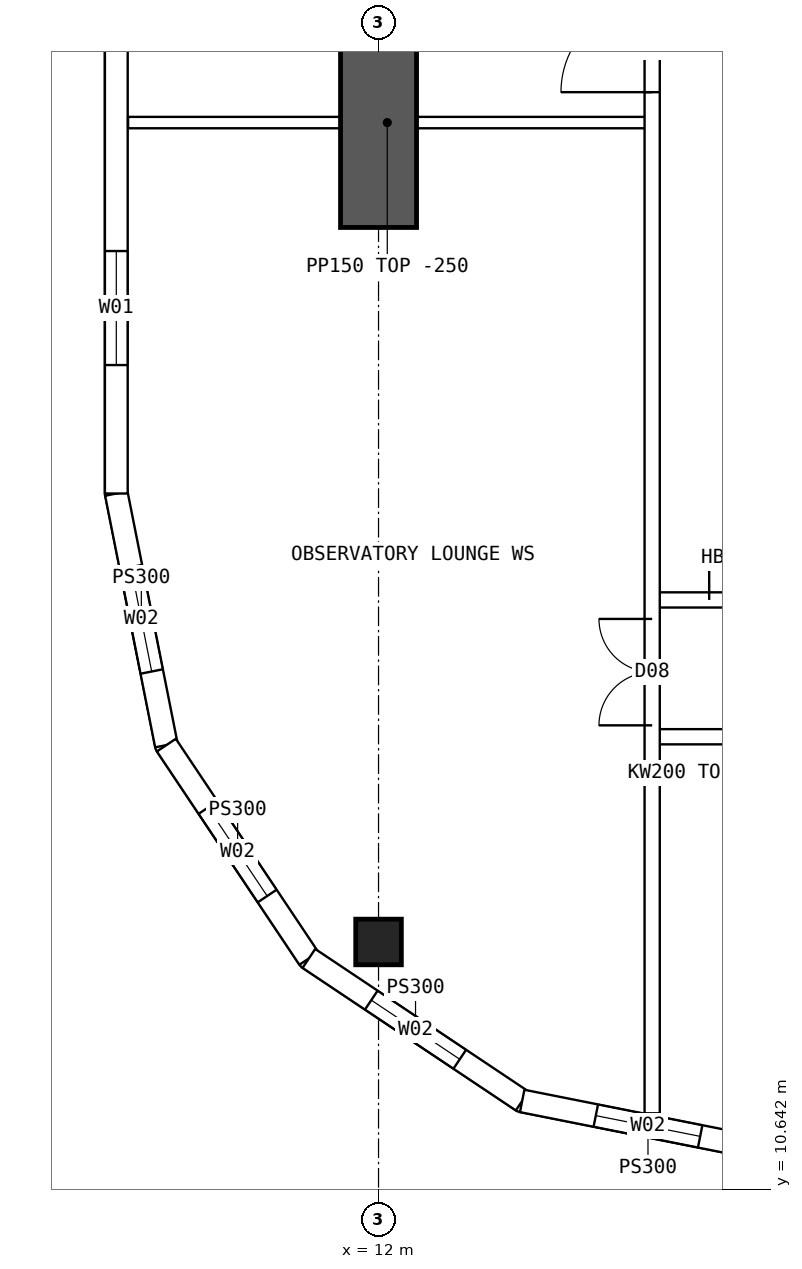
"""IFC4 building model, lengths in metres.
Left out: names, types, materials, properties, quantities, classifications, styles, units other than length and angle.
Written with IfcOpenShell. Run it as: python <this file> out.ifc"""

import sys

from ifc_helpers import new_model, si_unit, direction, frame, frame_2d, origin, origin_2d, place, context, subcontext, project, spatial, polyline, rectangle, hollow_rectangle, outline, extrude, element, fill, save


model = new_model("IFC4")
c1 = context("Model", 3, precision=1e-05, world=origin(), true_north=direction((0.0, 1.0)))
c2 = subcontext(c1, "Body", "Model", "MODEL_VIEW")
j1 = project(units=[si_unit("LENGTHUNIT", "METRE"), si_unit("PLANEANGLEUNIT", "RADIAN")], contexts=[c1])
p1 = place(None, origin())
s1 = spatial("IfcSite", under=j1, at=p1, CompositionType="ELEMENT")
p2 = place(p1, origin())
s2 = spatial("IfcBuilding", under=s1, at=p2, CompositionType="ELEMENT")
p3 = place(p2, frame((0.0, 0.0, 216.55)))
s3 = spatial("IfcBuildingStorey", under=s2, at=p3, CompositionType="ELEMENT", Elevation=216.55)
p4 = place(p3, frame((12.0, 13.9, 0.0), z_axis=(0.0, 0.0, 1.0), x_axis=(1.0, 0.0, 0.0)))
e1 = element("IfcColumn", 1, at=p4, inside=s3, PredefinedType="COLUMN", context=c2, shape_type="SweptSolid", body=[
    extrude(hollow_rectangle(XDim=0.6, YDim=0.6, WallThickness=0.06, at=origin_2d()), origin(), (0.0, 0.0, 1.0), 3.75),
])
p5 = place(p3, frame((12.0, 23.3, 0.0), z_axis=(0.0, 0.0, 1.0), x_axis=(0.0, 1.0, 0.0)))
e2 = element("IfcWall", 2, at=p5, inside=s3, PredefinedType="SHEAR", context=c2, shape_type="SweptSolid", body=[
    extrude(rectangle(XDim=5.0, YDim=1.0, at=frame_2d((2.5, 0.0))), origin(), (0.0, 0.0, 1.0), 3.75),
])
p6 = place(p3, frame((8.55, 44.2, 0.0), z_axis=(0.0, 0.0, 1.0), x_axis=(0.0, -1.0, 0.0)))
e3 = element("IfcWall", 3, at=p6, inside=s3, PredefinedType="SOLIDWALL", context=c2, shape_type="SweptSolid", body=[
    extrude(outline(polyline([(-0.015, -0.15), (24.415, -0.15), (24.385, 0.15), (0.015, 0.15), (-0.015, -0.15)])), origin(), (0.0, 0.0, 1.0), 3.5),
])
p7 = place(p6, frame((1.69, 0.0, 0.9)))
e4 = element("IfcOpeningElement", 4, at=p7, cuts=e3, PredefinedType="OPENING", context=c2, shape_type="SweptSolid", body=[
    extrude(rectangle(XDim=1.5, YDim=2.0, at=frame_2d((0.75, 1.0))), frame((0.0, 0.16, 0.0), z_axis=(0.0, -1.0, 0.0), x_axis=(1.0, 0.0, 0.0)), (0.0, 0.0, 1.0), 0.32),
])
p8 = place(p6, frame((6.57, 0.0, 0.9)))
e5 = element("IfcOpeningElement", 5, at=p8, cuts=e3, PredefinedType="OPENING", context=c2, shape_type="SweptSolid", body=[
    extrude(rectangle(XDim=1.5, YDim=2.0, at=frame_2d((0.75, 1.0))), frame((0.0, 0.16, 0.0), z_axis=(0.0, -1.0, 0.0), x_axis=(1.0, 0.0, 0.0)), (0.0, 0.0, 1.0), 0.32),
])
p9 = place(p6, frame((11.45, 0.0, 0.9)))
e6 = element("IfcOpeningElement", 6, at=p9, cuts=e3, PredefinedType="OPENING", context=c2, shape_type="SweptSolid", body=[
    extrude(rectangle(XDim=1.5, YDim=2.0, at=frame_2d((0.75, 1.0))), frame((0.0, 0.16, 0.0), z_axis=(0.0, -1.0, 0.0), x_axis=(1.0, 0.0, 0.0)), (0.0, 0.0, 1.0), 0.32),
])
p10 = place(p6, frame((16.33, 0.0, 0.9)))
e7 = element("IfcOpeningElement", 7, at=p10, cuts=e3, PredefinedType="OPENING", context=c2, shape_type="SweptSolid", body=[
    extrude(rectangle(XDim=1.5, YDim=2.0, at=frame_2d((0.75, 1.0))), frame((0.0, 0.16, 0.0), z_axis=(0.0, -1.0, 0.0), x_axis=(1.0, 0.0, 0.0)), (0.0, 0.0, 1.0), 0.32),
])
p11 = place(p6, frame((21.21, 0.0, 0.9)))
e8 = element("IfcOpeningElement", 8, at=p11, cuts=e3, PredefinedType="OPENING", context=c2, shape_type="SweptSolid", body=[
    extrude(rectangle(XDim=1.5, YDim=2.0, at=frame_2d((0.75, 1.0))), frame((0.0, 0.16, 0.0), z_axis=(0.0, -1.0, 0.0), x_axis=(1.0, 0.0, 0.0)), (0.0, 0.0, 1.0), 0.32),
])
p12 = place(p3, frame((8.55, 19.8, 0.0), z_axis=(0.0, 0.0, 1.0), x_axis=(0.19508664885, -0.980786011034, 0.0)))
e9 = element("IfcWall", 9, at=p12, inside=s3, PredefinedType="SOLIDWALL", context=c2, shape_type="SweptSolid", body=[
    extrude(outline(polyline([(-0.015, -0.15), (3.405, -0.15), (3.345, 0.15), (0.015, 0.15), (-0.015, -0.15)])), origin(), (0.0, 0.0, 1.0), 3.5),
])
p13 = place(p12, frame((0.988, 0.0, 0.9)))
e10 = element("IfcOpeningElement", 10, at=p13, cuts=e9, PredefinedType="OPENING", context=c2, shape_type="SweptSolid", body=[
    extrude(rectangle(XDim=1.4, YDim=1.8, at=frame_2d((0.7, 0.9))), frame((0.0, 0.16, 0.0), z_axis=(0.0, -1.0, 0.0), x_axis=(1.0, 0.0, 0.0)), (0.0, 0.0, 1.0), 0.32),
])
p14 = place(p3, frame((9.208, 16.49, 0.0), z_axis=(0.0, 0.0, 1.0), x_axis=(0.555567969291, -0.831471124873, 0.0)))
e11 = element("IfcWall", 11, at=p14, inside=s3, PredefinedType="SOLIDWALL", context=c2, shape_type="SweptSolid", body=[
    extrude(outline(polyline([(-0.03, -0.15), (3.405, -0.15), (3.345, 0.15), (0.03, 0.15), (-0.03, -0.15)])), origin(), (0.0, 0.0, 1.0), 3.5),
])
p15 = place(p14, frame((0.988, 0.0, 0.9)))
e12 = element("IfcOpeningElement", 12, at=p15, cuts=e11, PredefinedType="OPENING", context=c2, shape_type="SweptSolid", body=[
    extrude(rectangle(XDim=1.4, YDim=1.8, at=frame_2d((0.7, 0.9))), frame((0.0, 0.16, 0.0), z_axis=(0.0, -1.0, 0.0), x_axis=(1.0, 0.0, 0.0)), (0.0, 0.0, 1.0), 0.32),
])
p16 = place(p3, frame((11.083, 13.684, 0.0), z_axis=(0.0, 0.0, 1.0), x_axis=(0.831460037396, -0.555584562613, 0.0)))
e13 = element("IfcWall", 13, at=p16, inside=s3, PredefinedType="SOLIDWALL", context=c2, shape_type="SweptSolid", body=[
    extrude(outline(polyline([(-0.03, -0.15), (3.405, -0.15), (3.345, 0.15), (0.03, 0.15), (-0.03, -0.15)])), origin(), (0.0, 0.0, 1.0), 3.5),
])
p17 = place(p16, frame((0.988, 0.0, 0.9)))
e14 = element("IfcOpeningElement", 14, at=p17, cuts=e13, PredefinedType="OPENING", context=c2, shape_type="SweptSolid", body=[
    extrude(rectangle(XDim=1.4, YDim=1.8, at=frame_2d((0.7, 0.9))), frame((0.0, 0.16, 0.0), z_axis=(0.0, -1.0, 0.0), x_axis=(1.0, 0.0, 0.0)), (0.0, 0.0, 1.0), 0.32),
])
p18 = place(p3, frame((13.89, 11.808, 0.0), z_axis=(0.0, 0.0, 1.0), x_axis=(0.98078325777, -0.195100490205, 0.0)))
e15 = element("IfcWall", 15, at=p18, inside=s3, PredefinedType="SOLIDWALL", context=c2, shape_type="SweptSolid", body=[
    extrude(outline(polyline([(-0.03, -0.15), (3.405, -0.15), (3.345, 0.15), (0.03, 0.15), (-0.03, -0.15)])), origin(), (0.0, 0.0, 1.0), 3.5),
])
p19 = place(p18, frame((0.988, 0.0, 0.9)))
e16 = element("IfcOpeningElement", 16, at=p19, cuts=e15, PredefinedType="OPENING", context=c2, shape_type="SweptSolid", body=[
    extrude(rectangle(XDim=1.4, YDim=1.8, at=frame_2d((0.7, 0.9))), frame((0.0, 0.16, 0.0), z_axis=(0.0, -1.0, 0.0), x_axis=(1.0, 0.0, 0.0)), (0.0, 0.0, 1.0), 0.32),
])
p20 = place(p3, frame((15.6, 16.6, 0.0), z_axis=(0.0, 0.0, 1.0), x_axis=(1.0, 0.0, 0.0)))
e17 = element("IfcWall", 17, at=p20, inside=s3, PredefinedType="SOLIDWALL", context=c2, shape_type="SweptSolid", body=[
    extrude(rectangle(XDim=2.05, YDim=0.2, at=frame_2d((1.025, 0.0))), origin(), (0.0, 0.0, 1.0), 3.5),
])
p21 = place(p20, frame((0.95, 0.0, 0.0)))
e18 = element("IfcOpeningElement", 18, at=p21, cuts=e17, PredefinedType="OPENING", context=c2, shape_type="SweptSolid", body=[
    extrude(rectangle(XDim=0.9, YDim=2.1, at=frame_2d((0.45, 1.05))), frame((0.0, 0.11, 0.0), z_axis=(0.0, -1.0, 0.0), x_axis=(1.0, 0.0, 0.0)), (0.0, 0.0, 1.0), 0.22),
])
p22 = place(p3, frame((15.6, 18.4, 0.0), z_axis=(0.0, 0.0, 1.0), x_axis=(1.0, 0.0, 0.0)))
e19 = element("IfcWall", 19, at=p22, inside=s3, PredefinedType="SOLIDWALL", context=c2, shape_type="SweptSolid", body=[
    extrude(rectangle(XDim=2.05, YDim=0.2, at=frame_2d((1.025, 0.0))), origin(), (0.0, 0.0, 1.0), 3.5),
])
p23 = place(p22, frame((0.75, 0.0, 0.0)))
e20 = element("IfcOpeningElement", 20, at=p23, cuts=e19, PredefinedType="OPENING", context=c2, shape_type="SweptSolid", body=[
    extrude(rectangle(XDim=1.2, YDim=2.1, at=frame_2d((0.6, 1.05))), frame((0.0, 0.11, 0.0), z_axis=(0.0, -1.0, 0.0), x_axis=(1.0, 0.0, 0.0)), (0.0, 0.0, 1.0), 0.22),
])
p24 = place(p3, frame((15.6, 11.646, 0.0), z_axis=(0.0, 0.0, 1.0), x_axis=(0.0, 1.0, 0.0)))
e21 = element("IfcWall", 21, at=p24, inside=s3, PredefinedType="SOLIDWALL", context=c2, shape_type="SweptSolid", body=[
    extrude(rectangle(XDim=40.708, YDim=0.2, at=frame_2d((20.354, 0.0))), origin(), (0.0, 0.0, 1.0), 3.5),
])
p25 = place(p24, frame((13.434, 0.0, 0.0)))
e22 = element("IfcOpeningElement", 22, at=p25, cuts=e21, PredefinedType="OPENING", context=c2, shape_type="SweptSolid", body=[
    extrude(rectangle(XDim=1.2, YDim=2.1, at=frame_2d((0.6, 1.05))), frame((0.0, 0.11, 0.0), z_axis=(0.0, -1.0, 0.0), x_axis=(1.0, 0.0, 0.0)), (0.0, 0.0, 1.0), 0.22),
])
p26 = place(p24, frame((5.104, 0.0, 0.0)))
e23 = element("IfcOpeningElement", 23, at=p26, cuts=e21, PredefinedType="OPENING", context=c2, shape_type="SweptSolid", body=[
    extrude(rectangle(XDim=1.4, YDim=2.1, at=frame_2d((0.7, 1.05))), frame((0.0, 0.11, 0.0), z_axis=(0.0, -1.0, 0.0), x_axis=(1.0, 0.0, 0.0)), (0.0, 0.0, 1.0), 0.22),
])
p27 = place(p24, frame((34.104, 0.0, 0.0)))
e24 = element("IfcOpeningElement", 24, at=p27, cuts=e21, PredefinedType="OPENING", context=c2, shape_type="SweptSolid", body=[
    extrude(rectangle(XDim=1.4, YDim=2.1, at=frame_2d((0.7, 1.05))), frame((0.0, 0.11, 0.0), z_axis=(0.0, -1.0, 0.0), x_axis=(1.0, 0.0, 0.0)), (0.0, 0.0, 1.0), 0.22),
])
p28 = place(p3, frame((8.705, 24.68, 0.0), z_axis=(0.0, 0.0, 1.0), x_axis=(1.0, 0.0, 0.0)))
e25 = element("IfcWall", 25, at=p28, inside=s3, PredefinedType="PARTITIONING", context=c2, shape_type="SweptSolid", body=[
    extrude(rectangle(XDim=6.82, YDim=0.15, at=frame_2d((3.41, 0.0))), origin(), (0.0, 0.0, 1.0), 3.5),
])
p29 = place(p11, origin())
e26 = element("IfcWindow", 26, at=p29, inside=s3, PartitioningType="SINGLE_PANEL", PredefinedType="WINDOW", context=c2, shape_type="SweptSolid", body=[
    extrude(rectangle(XDim=1.5, YDim=2.0, at=frame_2d((0.75, 1.0))), frame((0.0, 0.03, 0.0), z_axis=(0.0, -1.0, 0.0), x_axis=(1.0, 0.0, 0.0)), (0.0, 0.0, 1.0), 0.06),
])
fill(e8, e26)
p30 = place(p13, origin())
e27 = element("IfcWindow", 27, at=p30, inside=s3, PartitioningType="SINGLE_PANEL", PredefinedType="WINDOW", context=c2, shape_type="SweptSolid", body=[
    extrude(rectangle(XDim=1.4, YDim=1.8, at=frame_2d((0.7, 0.9))), frame((0.0, 0.03, 0.0), z_axis=(0.0, -1.0, 0.0), x_axis=(1.0, 0.0, 0.0)), (0.0, 0.0, 1.0), 0.06),
])
fill(e10, e27)
p31 = place(p15, origin())
e28 = element("IfcWindow", 28, at=p31, inside=s3, PartitioningType="SINGLE_PANEL", PredefinedType="WINDOW", context=c2, shape_type="SweptSolid", body=[
    extrude(rectangle(XDim=1.4, YDim=1.8, at=frame_2d((0.7, 0.9))), frame((0.0, 0.03, 0.0), z_axis=(0.0, -1.0, 0.0), x_axis=(1.0, 0.0, 0.0)), (0.0, 0.0, 1.0), 0.06),
])
fill(e12, e28)
p32 = place(p17, origin())
e29 = element("IfcWindow", 29, at=p32, inside=s3, PartitioningType="SINGLE_PANEL", PredefinedType="WINDOW", context=c2, shape_type="SweptSolid", body=[
    extrude(rectangle(XDim=1.4, YDim=1.8, at=frame_2d((0.7, 0.9))), frame((0.0, 0.03, 0.0), z_axis=(0.0, -1.0, 0.0), x_axis=(1.0, 0.0, 0.0)), (0.0, 0.0, 1.0), 0.06),
])
fill(e14, e29)
p33 = place(p19, origin())
e30 = element("IfcWindow", 30, at=p33, inside=s3, PartitioningType="SINGLE_PANEL", PredefinedType="WINDOW", context=c2, shape_type="SweptSolid", body=[
    extrude(rectangle(XDim=1.4, YDim=1.8, at=frame_2d((0.7, 0.9))), frame((0.0, 0.03, 0.0), z_axis=(0.0, -1.0, 0.0), x_axis=(1.0, 0.0, 0.0)), (0.0, 0.0, 1.0), 0.06),
])
fill(e16, e30)
p34 = place(p23, origin())
e31 = element("IfcDoor", 31, at=p34, inside=s3, OperationType="DOUBLE_DOOR_SINGLE_SWING", PredefinedType="DOOR", context=c2, shape_type="SweptSolid", body=[
    extrude(rectangle(XDim=1.2, YDim=2.1, at=frame_2d((0.6, 1.05))), frame((0.0, 0.025, 0.0), z_axis=(0.0, -1.0, 0.0), x_axis=(1.0, 0.0, 0.0)), (0.0, 0.0, 1.0), 0.05),
])
fill(e20, e31)
p35 = place(p25, origin())
e32 = element("IfcDoor", 32, at=p35, inside=s3, OperationType="SINGLE_SWING_LEFT", PredefinedType="DOOR", context=c2, shape_type="SweptSolid", body=[
    extrude(rectangle(XDim=1.2, YDim=2.1, at=frame_2d((0.6, 1.05))), frame((0.0, 0.025, 0.0), z_axis=(0.0, -1.0, 0.0), x_axis=(1.0, 0.0, 0.0)), (0.0, 0.0, 1.0), 0.05),
])
fill(e22, e32)
p36 = place(p26, origin())
e33 = element("IfcDoor", 33, at=p36, inside=s3, OperationType="DOUBLE_DOOR_SINGLE_SWING", PredefinedType="DOOR", context=c2, shape_type="SweptSolid", body=[
    extrude(rectangle(XDim=1.4, YDim=2.1, at=frame_2d((0.7, 1.05))), frame((0.0, 0.025, 0.0), z_axis=(0.0, -1.0, 0.0), x_axis=(1.0, 0.0, 0.0)), (0.0, 0.0, 1.0), 0.05),
])
fill(e23, e33)
save(model, sys.argv[1])
